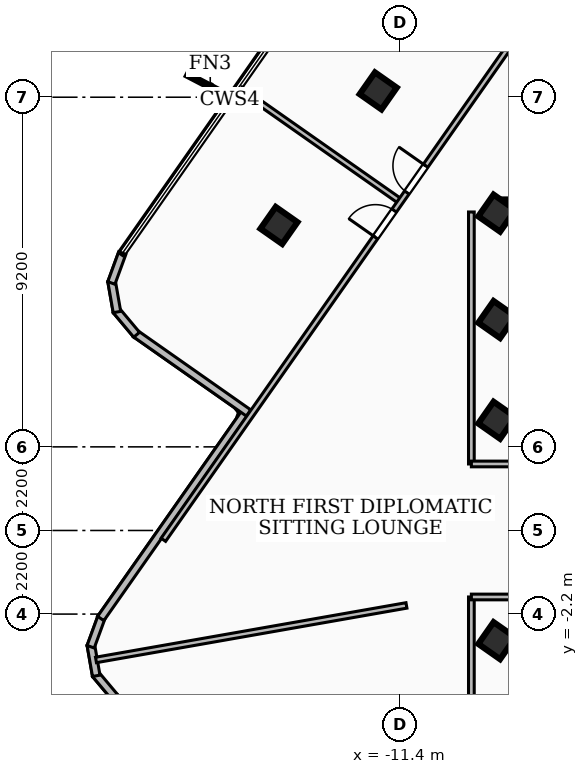
"""IFC4 building model, lengths in metres.
Left out: names, types, materials, properties, quantities, classifications, styles, units other than length and angle.
Written with IfcOpenShell. Run it as: python <this file> out.ifc"""

import sys

from ifc_helpers import new_model, si_unit, direction, frame, frame_2d, origin, origin_2d, place, context, subcontext, project, spatial, rectangle, extrude, element, fill, save


model = new_model("IFC4")
c1 = context("Model", 3, precision=1e-05, world=origin(), true_north=direction((0.0, 1.0)))
c2 = subcontext(c1, "Body", "Model", "MODEL_VIEW")
j1 = project(units=[si_unit("LENGTHUNIT", "METRE"), si_unit("PLANEANGLEUNIT", "RADIAN")], contexts=[c1])
p1 = place(None, origin())
s1 = spatial("IfcSite", under=j1, at=p1, CompositionType="ELEMENT")
p2 = place(p1, origin())
s2 = spatial("IfcBuilding", under=s1, at=p2, CompositionType="ELEMENT")
p3 = place(p2, frame((0.0, 0.0, 268.02)))
s3 = spatial("IfcBuildingStorey", under=s2, at=p3, CompositionType="ELEMENT", Elevation=268.02)
p4 = place(p3, frame((-8.78, 8.51, 0.0), z_axis=(0.0, 0.0, 1.0), x_axis=(1.0, 0.0, 0.0)))
e1 = element("IfcWall", 1, at=p4, inside=s3, PredefinedType="SHEAR", context=c2, shape_type="SweptSolid", body=[
    extrude(rectangle(XDim=17.56, YDim=0.4, at=frame_2d((8.78, 0.0))), origin(), (0.0, 0.0, 1.0), 3.16),
])
for number, where, z_axis, x_axis in (
    (2, (-8.85, -2.9, 0.0), (0.0, 0.0, 1.0), (0.574, 0.819, 0.0)),
    (3, (-8.85, 2.9, 0.0), (0.0, 0.0, 1.0), (0.574, 0.819, 0.0)),
    (4, (-8.85, 5.55, 0.0), (0.0, 0.0, 1.0), (0.574, 0.819, 0.0)),
    (5, (-8.85, 8.35, 0.0), (0.0, 0.0, 1.0), (0.574, 0.819, 0.0)),
    (6, (-11.971, 11.566, 0.0), (0.0, 0.0, 1.0), (0.574, 0.819, 0.0)),
    (7, (-14.583, 8.026, 0.0), (0.0, 0.0, 1.0), (0.574, 0.819, 0.0)),
):
    element("IfcColumn", number, at=place(p3, frame(where, z_axis=z_axis, x_axis=x_axis)), inside=s3, PredefinedType="COLUMN", context=c2, shape_type="SweptSolid", body=[
        extrude(rectangle(XDim=0.7, YDim=0.7, at=origin_2d()), origin(), (0.0, 0.0, 1.0), 3.42),
    ])
p5 = place(p3, frame((2.316, -19.273, 0.0), z_axis=(0.0, 0.0, 1.0), x_axis=(-0.81873650559, 0.574169430059, 0.0)))
e8 = element("IfcWall", 8, at=p5, inside=s3, PredefinedType="SOLIDWALL", context=c2, shape_type="SweptSolid", body=[
    extrude(rectangle(XDim=25.923, YDim=0.2, at=frame_2d((12.961, 0.0))), origin(), (0.0, 0.0, 1.0), 3.16),
])
p6 = place(p5, frame((19.32, 0.0, 0.85)))
e9 = element("IfcOpeningElement", 9, at=p6, cuts=e8, PredefinedType="OPENING", context=c2, shape_type="SweptSolid", body=[
    extrude(rectangle(XDim=1.8, YDim=1.8, at=frame_2d((0.9, 0.9))), frame((0.0, 0.11, 0.0), z_axis=(0.0, -1.0, 0.0), x_axis=(1.0, 0.0, 0.0)), (0.0, 0.0, 1.0), 0.22),
])
p7 = place(p3, frame((-18.872, -4.422, 0.0), z_axis=(0.0, 0.0, 1.0), x_axis=(-0.642816318642, 0.766020352528, 0.0)))
e10 = element("IfcWall", 10, at=p7, inside=s3, PredefinedType="SOLIDWALL", context=c2, shape_type="SweptSolid", body=[
    extrude(rectangle(XDim=0.838, YDim=0.2, at=frame_2d((0.419, 0.0))), origin(), (0.0, 0.0, 1.0), 3.16),
])
p8 = place(p3, frame((-19.391, -3.824, 0.0), z_axis=(0.0, 0.0, 1.0), x_axis=(-0.171877988141, 0.985118245285, 0.0)))
e11 = element("IfcWall", 11, at=p8, inside=s3, PredefinedType="SOLIDWALL", context=c2, shape_type="SweptSolid", body=[
    extrude(rectangle(XDim=0.825, YDim=0.2, at=frame_2d((0.413, 0.0))), origin(), (0.0, 0.0, 1.0), 3.16),
])
p9 = place(p3, frame((-19.538, -3.059, 0.0), z_axis=(0.0, 0.0, 1.0), x_axis=(0.344083284363, 0.938939131905, 0.0)))
e12 = element("IfcWall", 12, at=p9, inside=s3, PredefinedType="SOLIDWALL", context=c2, shape_type="SweptSolid", body=[
    extrude(rectangle(XDim=0.837, YDim=0.2, at=frame_2d((0.418, 0.0))), origin(), (0.0, 0.0, 1.0), 3.16),
])
p10 = place(p3, frame((-19.273, -2.316, 0.0), z_axis=(0.0, 0.0, 1.0), x_axis=(0.574227764949, 0.818695592978, 0.0)))
e13 = element("IfcWall", 13, at=p10, inside=s3, PredefinedType="SOLIDWALL", context=c2, shape_type="SweptSolid", body=[
    extrude(rectangle(XDim=6.741, YDim=0.2, at=frame_2d((3.371, 0.0))), origin(), (0.0, 0.0, 1.0), 3.16),
])
p11 = place(p3, frame((-15.383, 3.092, 0.0), z_axis=(0.0, 0.0, 1.0), x_axis=(-0.818664531158, 0.574272048269, 0.0)))
e14 = element("IfcWall", 14, at=p11, inside=s3, PredefinedType="SOLIDWALL", context=c2, shape_type="SweptSolid", body=[
    extrude(rectangle(XDim=3.641, YDim=0.2, at=frame_2d((1.821, 0.0))), origin(), (0.0, 0.0, 1.0), 3.16),
])
p12 = place(p3, frame((-18.328, 5.15, 0.0), z_axis=(0.0, 0.0, 1.0), x_axis=(-0.642303159159, 0.766450684477, 0.0)))
e15 = element("IfcWall", 15, at=p12, inside=s3, PredefinedType="SOLIDWALL", context=c2, shape_type="SweptSolid", body=[
    extrude(rectangle(XDim=0.838, YDim=0.2, at=frame_2d((0.419, 0.0))), origin(), (0.0, 0.0, 1.0), 3.16),
])
p13 = place(p3, frame((-18.846, 5.748, 0.0), z_axis=(0.0, 0.0, 1.0), x_axis=(-0.172165058078, 0.985068115806, 0.0)))
e16 = element("IfcWall", 16, at=p13, inside=s3, PredefinedType="SOLIDWALL", context=c2, shape_type="SweptSolid", body=[
    extrude(rectangle(XDim=0.825, YDim=0.2, at=frame_2d((0.413, 0.0))), origin(), (0.0, 0.0, 1.0), 3.16),
])
p14 = place(p3, frame((-18.993, 6.513, 0.0), z_axis=(0.0, 0.0, 1.0), x_axis=(0.343449935769, 0.93917098636, 0.0)))
e17 = element("IfcWall", 17, at=p14, inside=s3, PredefinedType="SOLIDWALL", context=c2, shape_type="SweptSolid", body=[
    extrude(rectangle(XDim=0.838, YDim=0.2, at=frame_2d((0.419, 0.0))), origin(), (0.0, 0.0, 1.0), 3.16),
])
p15 = place(p3, frame((-9.52, 1.75, 0.0), z_axis=(0.0, 0.0, 1.0), x_axis=(0.0, 1.0, 0.0)))
e18 = element("IfcWall", 18, at=p15, inside=s3, PredefinedType="PARTITIONING", context=c2, shape_type="SweptSolid", body=[
    extrude(rectangle(XDim=6.63, YDim=0.15, at=frame_2d((3.315, 0.0))), origin(), (0.0, 0.0, 1.0), 2.53),
])
p16 = place(p3, frame((-7.85, 1.75, 0.0), z_axis=(0.0, 0.0, 1.0), x_axis=(-1.0, 0.0, 0.0)))
e19 = element("IfcWall", 19, at=p16, inside=s3, PredefinedType="PARTITIONING", context=c2, shape_type="SweptSolid", body=[
    extrude(rectangle(XDim=1.67, YDim=0.15, at=frame_2d((0.835, 0.0))), origin(), (0.0, 0.0, 1.0), 2.39),
])
p17 = place(p3, frame((-9.52, -8.38, 0.0), z_axis=(0.0, 0.0, 1.0), x_axis=(0.0, 1.0, 0.0)))
e20 = element("IfcWall", 20, at=p17, inside=s3, PredefinedType="PARTITIONING", context=c2, shape_type="SweptSolid", body=[
    extrude(rectangle(XDim=6.63, YDim=0.15, at=frame_2d((3.315, 0.0))), origin(), (0.0, 0.0, 1.0), 3.16),
])
p18 = place(p3, frame((-7.85, -1.75, 0.0), z_axis=(0.0, 0.0, 1.0), x_axis=(-1.0, 0.0, 0.0)))
e21 = element("IfcWall", 21, at=p18, inside=s3, PredefinedType="PARTITIONING", context=c2, shape_type="SweptSolid", body=[
    extrude(rectangle(XDim=1.67, YDim=0.15, at=frame_2d((0.835, 0.0))), origin(), (0.0, 0.0, 1.0), 2.39),
])
p19 = place(p3, frame((-11.228, -1.972, 0.0), z_axis=(0.0, 0.0, 1.0), x_axis=(-0.984921322849, -0.17300285488, 0.0)))
e22 = element("IfcWall", 22, at=p19, inside=s3, PredefinedType="PARTITIONING", context=c2, shape_type="SweptSolid", body=[
    extrude(rectangle(XDim=8.295, YDim=0.145, at=frame_2d((4.147, 0.0))), origin(), (0.0, 0.0, 1.0), 3.16),
])
p20 = place(p3, frame((-11.433, 8.689, 0.0), z_axis=(0.0, 0.0, 1.0), x_axis=(-0.81868341552, 0.574245126363, 0.0)))
e23 = element("IfcWall", 23, at=p20, inside=s3, PredefinedType="PARTITIONING", context=c2, shape_type="SweptSolid", body=[
    extrude(rectangle(XDim=5.085, YDim=0.145, at=frame_2d((2.542, 0.0))), origin(), (0.0, 0.0, 1.0), 3.16),
])
p21 = place(p3, frame((-17.625, -0.245, 0.0), z_axis=(0.0, 0.0, 1.0), x_axis=(0.574126736534, 0.818766444352, 0.0)))
e24 = element("IfcWall", 24, at=p21, inside=s3, PredefinedType="PARTITIONING", context=c2, shape_type="SweptSolid", body=[
    extrude(rectangle(XDim=20.34, YDim=0.145, at=frame_2d((10.17, 0.0))), origin(), (0.0, 0.0, 1.0), 2.53),
])
p22 = place(p21, frame((11.16, 0.0, 0.0)))
e25 = element("IfcOpeningElement", 25, at=p22, cuts=e24, PredefinedType="OPENING", context=c2, shape_type="SweptSolid", body=[
    extrude(rectangle(XDim=0.86, YDim=2.04, at=frame_2d((0.43, 1.02))), frame((0.0, 0.083, 0.0), z_axis=(0.0, -1.0, 0.0), x_axis=(1.0, 0.0, 0.0)), (0.0, 0.0, 1.0), 0.165),
])
p23 = place(p21, frame((9.72, 0.0, 0.0)))
e26 = element("IfcOpeningElement", 26, at=p23, cuts=e24, PredefinedType="OPENING", context=c2, shape_type="SweptSolid", body=[
    extrude(rectangle(XDim=0.86, YDim=2.04, at=frame_2d((0.43, 1.02))), frame((0.0, 0.083, 0.0), z_axis=(0.0, -1.0, 0.0), x_axis=(1.0, 0.0, 0.0)), (0.0, 0.0, 1.0), 0.165),
])
p24 = place(p22, origin())
e27 = element("IfcDoor", 27, at=p24, inside=s3, OperationType="SINGLE_SWING_RIGHT", PredefinedType="DOOR", context=c2, shape_type="SweptSolid", body=[
    extrude(rectangle(XDim=0.86, YDim=2.04, at=frame_2d((0.43, 1.02))), frame((0.0, 0.025, 0.0), z_axis=(0.0, -1.0, 0.0), x_axis=(1.0, 0.0, 0.0)), (0.0, 0.0, 1.0), 0.05),
])
fill(e25, e27)
p25 = place(p23, origin())
e28 = element("IfcDoor", 28, at=p25, inside=s3, OperationType="SINGLE_SWING_LEFT", PredefinedType="DOOR", context=c2, shape_type="SweptSolid", body=[
    extrude(rectangle(XDim=0.86, YDim=2.04, at=frame_2d((0.43, 1.02))), frame((0.0, 0.025, 0.0), z_axis=(0.0, -1.0, 0.0), x_axis=(1.0, 0.0, 0.0)), (0.0, 0.0, 1.0), 0.05),
])
fill(e26, e28)
save(model, sys.argv[1])
